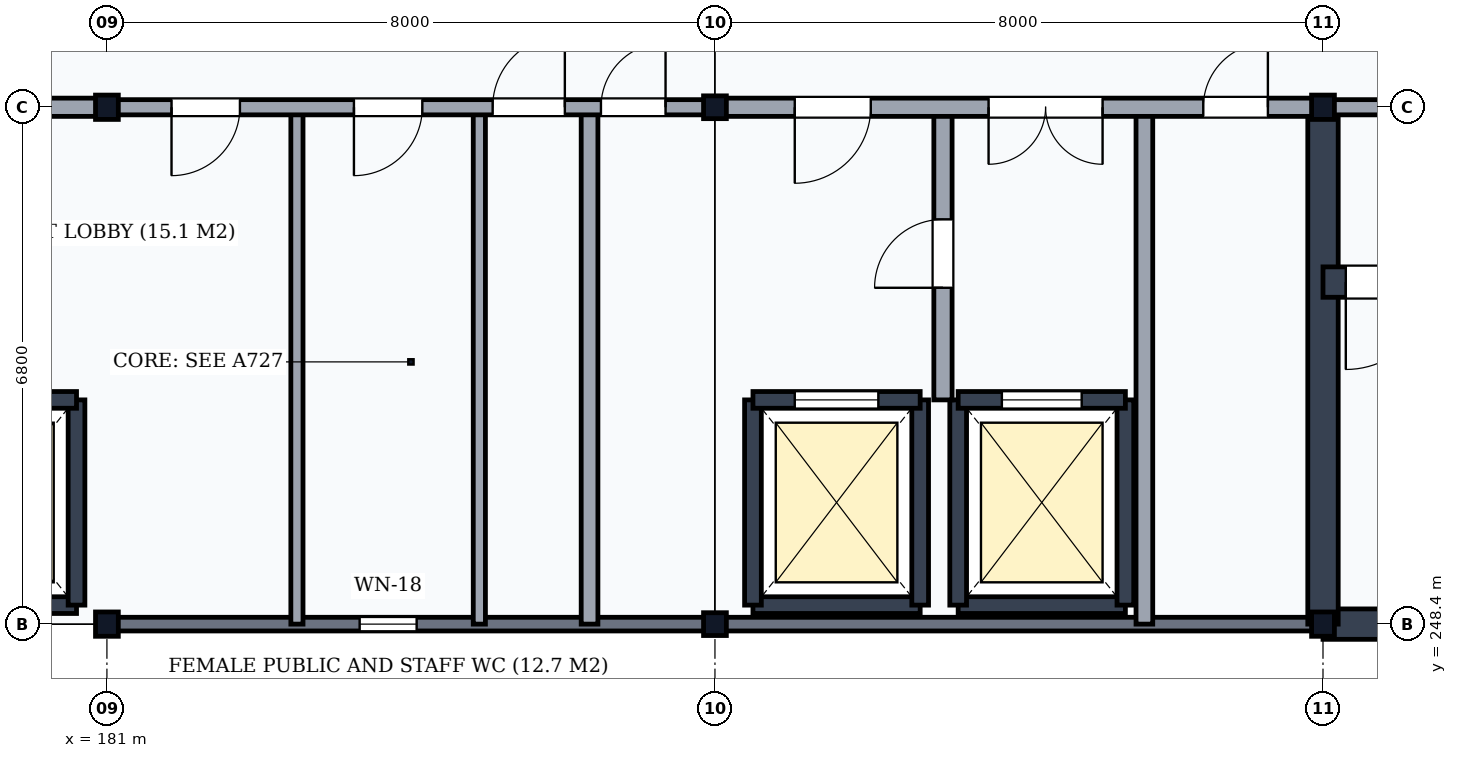
"""IFC4 building model, lengths in metres.
Left out: names, types, materials, properties, quantities, classifications, styles, units other than length and angle.
Written with IfcOpenShell. Run it as: python <this file> out.ifc"""

import sys

from ifc_helpers import new_model, si_unit, direction, frame, frame_2d, origin, origin_2d, place, context, subcontext, project, spatial, rectangle, i_section, extrude, element, fill, save


model = new_model("IFC4")
c1 = context("Model", 3, precision=1e-05, world=origin(), true_north=direction((0.0, 1.0)))
c2 = subcontext(c1, "Body", "Model", "MODEL_VIEW")
j1 = project(units=[si_unit("LENGTHUNIT", "METRE"), si_unit("PLANEANGLEUNIT", "RADIAN")], contexts=[c1])
p1 = place(None, origin())
s1 = spatial("IfcSite", under=j1, at=p1, CompositionType="ELEMENT")
p2 = place(p1, origin())
s2 = spatial("IfcBuilding", under=s1, at=p2, CompositionType="ELEMENT")
p3 = place(p2, frame((0.0, 0.0, 67.8)))
s3 = spatial("IfcBuildingStorey", under=s2, at=p3, CompositionType="ELEMENT", Elevation=67.8)
for number, where, z_axis, x_axis in (
    (1, (181.0, 248.4, 0.0), (0.0, 0.0, 1.0), (1.0, 0.0, 0.0)),
    (2, (181.0, 255.2, 0.0), (0.0, 0.0, 1.0), (1.0, 0.0, 0.0)),
):
    element("IfcColumn", number, at=place(p3, frame(where, z_axis=z_axis, x_axis=x_axis)), inside=s3, PredefinedType="COLUMN", context=c2, shape_type="SweptSolid", body=[
        extrude(i_section(OverallWidth=0.3, OverallDepth=0.32, WebThickness=0.011, FlangeThickness=0.021, FilletRadius=0.027, at=origin_2d()), origin(), (0.0, 0.0, 1.0), 4.5),
    ])
for number, where, z_axis, x_axis in (
    (3, (189.0, 248.4, 0.0), (0.0, 0.0, 1.0), (1.0, 0.0, 0.0)),
    (4, (189.0, 255.2, 0.0), (0.0, 0.0, 1.0), (1.0, 0.0, 0.0)),
):
    element("IfcColumn", number, at=place(p3, frame(where, z_axis=z_axis, x_axis=x_axis)), inside=s3, PredefinedType="COLUMN", context=c2, shape_type="SweptSolid", body=[
        extrude(i_section(OverallWidth=0.3, OverallDepth=0.3, WebThickness=0.011, FlangeThickness=0.019, FilletRadius=0.027, at=origin_2d()), origin(), (0.0, 0.0, 1.0), 4.5),
    ])
for number, where, z_axis, x_axis in (
    (5, (197.0, 248.4, 0.0), (0.0, 0.0, 1.0), (1.0, 0.0, 0.0)),
    (6, (197.0, 255.2, 0.0), (0.0, 0.0, 1.0), (1.0, 0.0, 0.0)),
):
    element("IfcColumn", number, at=place(p3, frame(where, z_axis=z_axis, x_axis=x_axis)), inside=s3, PredefinedType="COLUMN", context=c2, shape_type="SweptSolid", body=[
        extrude(i_section(OverallWidth=0.3, OverallDepth=0.32, WebThickness=0.011, FlangeThickness=0.021, FilletRadius=0.027, at=origin_2d()), origin(), (0.0, 0.0, 1.0), 4.5),
    ])
p4 = place(p3, frame((181.006, 248.4, 0.0), z_axis=(0.0, 0.0, 1.0), x_axis=(1.0, 0.0, 0.0)))
e7 = element("IfcWall", 7, at=p4, inside=s3, PredefinedType="SOLIDWALL", context=c2, shape_type="SweptSolid", body=[
    extrude(rectangle(XDim=7.988, YDim=0.18, at=frame_2d((3.994, 0.0))), origin(), (0.0, 0.0, 1.0), 3.988),
])
p5 = place(p4, frame((3.319, 0.0, 0.85)))
e8 = element("IfcOpeningElement", 8, at=p5, cuts=e7, PredefinedType="OPENING", context=c2, shape_type="SweptSolid", body=[
    extrude(rectangle(XDim=0.75, YDim=2.0, at=frame_2d((0.375, 1.0))), frame((0.0, 0.105, 0.0), z_axis=(0.0, -1.0, 0.0), x_axis=(1.0, 0.0, 0.0)), (0.0, 0.0, 1.0), 0.21),
])
p6 = place(p3, frame((189.006, 248.4, 0.0), z_axis=(0.0, 0.0, 1.0), x_axis=(1.0, 0.0, 0.0)))
e9 = element("IfcWall", 9, at=p6, inside=s3, PredefinedType="SOLIDWALL", context=c2, shape_type="SweptSolid", body=[
    extrude(rectangle(XDim=7.988, YDim=0.18, at=frame_2d((3.994, 0.0))), origin(), (0.0, 0.0, 1.0), 3.988),
])
p7 = place(p3, frame((197.0, 248.4, 0.0), z_axis=(0.0, 0.0, 1.0), x_axis=(1.0, 0.0, 0.0)))
e10 = element("IfcWall", 10, at=p7, inside=s3, PredefinedType="SHEAR", context=c2, shape_type="SweptSolid", body=[
    extrude(rectangle(XDim=8.0, YDim=0.4, at=frame_2d((4.0, 0.0))), origin(), (0.0, 0.0, 1.0), 4.3),
])
p8 = place(p3, frame((197.0, 248.4, 0.0), z_axis=(0.0, 0.0, 1.0), x_axis=(0.0, 1.0, 0.0)))
e11 = element("IfcWall", 11, at=p8, inside=s3, PredefinedType="SHEAR", context=c2, shape_type="SweptSolid", body=[
    extrude(rectangle(XDim=6.8, YDim=0.4, at=frame_2d((3.4, 0.0))), origin(), (0.0, 0.0, 1.0), 4.3),
])
p9 = place(p3, frame((197.0, 252.9, 0.0), z_axis=(0.0, 0.0, 1.0), x_axis=(1.0, 0.0, 0.0)))
e12 = element("IfcWall", 12, at=p9, inside=s3, PredefinedType="SHEAR", context=c2, shape_type="SweptSolid", body=[
    extrude(rectangle(XDim=8.0, YDim=0.4, at=frame_2d((4.0, 0.0))), origin(), (0.0, 0.0, 1.0), 4.3),
])
p10 = place(p9, frame((0.3, 0.0, 0.0)))
e13 = element("IfcOpeningElement", 13, at=p10, cuts=e12, PredefinedType="OPENING", context=c2, shape_type="SweptSolid", body=[
    extrude(rectangle(XDim=1.15, YDim=2.15, at=frame_2d((0.575, 1.075))), frame((0.0, 0.215, 0.0), z_axis=(0.0, -1.0, 0.0), x_axis=(1.0, 0.0, 0.0)), (0.0, 0.0, 1.0), 0.43),
])
p11 = place(p3, frame((197.0, 255.2, 0.0), z_axis=(0.0, 0.0, 1.0), x_axis=(1.0, 0.0, 0.0)))
e14 = element("IfcWall", 14, at=p11, inside=s3, PredefinedType="PARTITIONING", context=c2, shape_type="SweptSolid", body=[
    extrude(rectangle(XDim=8.0, YDim=0.2, at=frame_2d((4.0, 0.0))), origin(), (0.0, 0.0, 1.0), 3.798),
])
p12 = place(p11, frame((3.275, 0.0, 0.0)))
e15 = element("IfcOpeningElement", 15, at=p12, cuts=e14, PredefinedType="OPENING", context=c2, shape_type="SweptSolid", body=[
    extrude(rectangle(XDim=1.45, YDim=2.2, at=frame_2d((0.725, 1.1))), frame((0.0, 0.115, 0.0), z_axis=(0.0, -1.0, 0.0), x_axis=(1.0, 0.0, 0.0)), (0.0, 0.0, 1.0), 0.23),
])
p13 = place(p3, frame((178.4, 248.65, 0.0), z_axis=(0.0, 0.0, 1.0), x_axis=(1.0, 0.0, 0.0)))
e16 = element("IfcWall", 16, at=p13, inside=s3, PredefinedType="SHEAR", context=c2, shape_type="SweptSolid", body=[
    extrude(rectangle(XDim=2.2, YDim=0.22, at=frame_2d((1.1, 0.0))), origin(), (0.0, 0.0, 1.0), 4.3),
])
p14 = place(p3, frame((180.6, 248.65, 0.0), z_axis=(0.0, 0.0, 1.0), x_axis=(0.0, 1.0, 0.0)))
e17 = element("IfcWall", 17, at=p14, inside=s3, PredefinedType="SHEAR", context=c2, shape_type="SweptSolid", body=[
    extrude(rectangle(XDim=2.7, YDim=0.22, at=frame_2d((1.35, 0.0))), origin(), (0.0, 0.0, 1.0), 4.3),
])
p15 = place(p3, frame((178.4, 251.35, 0.0), z_axis=(0.0, 0.0, 1.0), x_axis=(1.0, 0.0, 0.0)))
e18 = element("IfcWall", 18, at=p15, inside=s3, PredefinedType="SHEAR", context=c2, shape_type="SweptSolid", body=[
    extrude(rectangle(XDim=2.2, YDim=0.22, at=frame_2d((1.1, 0.0))), origin(), (0.0, 0.0, 1.0), 4.3),
])
p16 = place(p15, frame((0.575, 0.0, 0.0)))
e19 = element("IfcOpeningElement", 19, at=p16, cuts=e18, PredefinedType="OPENING", context=c2, shape_type="SweptSolid", body=[
    extrude(rectangle(XDim=1.05, YDim=2.15, at=frame_2d((0.525, 1.075))), frame((0.0, 0.125, 0.0), z_axis=(0.0, -1.0, 0.0), x_axis=(1.0, 0.0, 0.0)), (0.0, 0.0, 1.0), 0.25),
])
p17 = place(p3, frame((189.5, 248.65, 0.0), z_axis=(0.0, 0.0, 1.0), x_axis=(1.0, 0.0, 0.0)))
e20 = element("IfcWall", 20, at=p17, inside=s3, PredefinedType="SHEAR", context=c2, shape_type="SweptSolid", body=[
    extrude(rectangle(XDim=2.2, YDim=0.22, at=frame_2d((1.1, 0.0))), origin(), (0.0, 0.0, 1.0), 4.3),
])
for number, where, z_axis, x_axis in (
    (21, (189.5, 248.65, 0.0), (0.0, 0.0, 1.0), (0.0, 1.0, 0.0)),
    (22, (191.7, 248.65, 0.0), (0.0, 0.0, 1.0), (0.0, 1.0, 0.0)),
):
    element("IfcWall", number, at=place(p3, frame(where, z_axis=z_axis, x_axis=x_axis)), inside=s3, PredefinedType="SHEAR", context=c2, shape_type="SweptSolid", body=[
        extrude(rectangle(XDim=2.7, YDim=0.22, at=frame_2d((1.35, 0.0))), origin(), (0.0, 0.0, 1.0), 4.3),
    ])
p18 = place(p3, frame((189.5, 251.35, 0.0), z_axis=(0.0, 0.0, 1.0), x_axis=(1.0, 0.0, 0.0)))
e23 = element("IfcWall", 23, at=p18, inside=s3, PredefinedType="SHEAR", context=c2, shape_type="SweptSolid", body=[
    extrude(rectangle(XDim=2.2, YDim=0.22, at=frame_2d((1.1, 0.0))), origin(), (0.0, 0.0, 1.0), 4.3),
])
p19 = place(p18, frame((0.55, 0.0, 0.0)))
e24 = element("IfcOpeningElement", 24, at=p19, cuts=e23, PredefinedType="OPENING", context=c2, shape_type="SweptSolid", body=[
    extrude(rectangle(XDim=1.1, YDim=2.15, at=frame_2d((0.55, 1.075))), frame((0.0, 0.125, 0.0), z_axis=(0.0, -1.0, 0.0), x_axis=(1.0, 0.0, 0.0)), (0.0, 0.0, 1.0), 0.25),
])
p20 = place(p3, frame((192.2, 248.65, 0.0), z_axis=(0.0, 0.0, 1.0), x_axis=(1.0, 0.0, 0.0)))
e25 = element("IfcWall", 25, at=p20, inside=s3, PredefinedType="SHEAR", context=c2, shape_type="SweptSolid", body=[
    extrude(rectangle(XDim=2.2, YDim=0.22, at=frame_2d((1.1, 0.0))), origin(), (0.0, 0.0, 1.0), 4.3),
])
for number, where, z_axis, x_axis in (
    (26, (192.2, 248.65, 0.0), (0.0, 0.0, 1.0), (0.0, 1.0, 0.0)),
    (27, (194.4, 248.65, 0.0), (0.0, 0.0, 1.0), (0.0, 1.0, 0.0)),
):
    element("IfcWall", number, at=place(p3, frame(where, z_axis=z_axis, x_axis=x_axis)), inside=s3, PredefinedType="SHEAR", context=c2, shape_type="SweptSolid", body=[
        extrude(rectangle(XDim=2.7, YDim=0.22, at=frame_2d((1.35, 0.0))), origin(), (0.0, 0.0, 1.0), 4.3),
    ])
p21 = place(p3, frame((192.2, 251.35, 0.0), z_axis=(0.0, 0.0, 1.0), x_axis=(1.0, 0.0, 0.0)))
e28 = element("IfcWall", 28, at=p21, inside=s3, PredefinedType="SHEAR", context=c2, shape_type="SweptSolid", body=[
    extrude(rectangle(XDim=2.2, YDim=0.22, at=frame_2d((1.1, 0.0))), origin(), (0.0, 0.0, 1.0), 4.3),
])
p22 = place(p21, frame((0.575, 0.0, 0.0)))
e29 = element("IfcOpeningElement", 29, at=p22, cuts=e28, PredefinedType="OPENING", context=c2, shape_type="SweptSolid", body=[
    extrude(rectangle(XDim=1.05, YDim=2.15, at=frame_2d((0.525, 1.075))), frame((0.0, 0.125, 0.0), z_axis=(0.0, -1.0, 0.0), x_axis=(1.0, 0.0, 0.0)), (0.0, 0.0, 1.0), 0.25),
])
p23 = place(p3, frame((192.0, 251.35, 0.0), z_axis=(0.0, 0.0, 1.0), x_axis=(0.0, 1.0, 0.0)))
e30 = element("IfcWall", 30, at=p23, inside=s3, PredefinedType="PARTITIONING", context=c2, shape_type="SweptSolid", body=[
    extrude(rectangle(XDim=3.85, YDim=0.24, at=frame_2d((1.925, 0.0))), origin(), (0.0, 0.0, 1.0), 4.3),
])
p24 = place(p23, frame((1.475, 0.0, 0.0)))
e31 = element("IfcOpeningElement", 31, at=p24, cuts=e30, PredefinedType="OPENING", context=c2, shape_type="SweptSolid", body=[
    extrude(rectangle(XDim=0.9, YDim=2.1, at=frame_2d((0.45, 1.05))), frame((0.0, 0.135, 0.0), z_axis=(0.0, -1.0, 0.0), x_axis=(1.0, 0.0, 0.0)), (0.0, 0.0, 1.0), 0.27),
])
p25 = place(p3, frame((194.65, 248.4, 0.0), z_axis=(0.0, 0.0, 1.0), x_axis=(0.0, 1.0, 0.0)))
e32 = element("IfcWall", 32, at=p25, inside=s3, PredefinedType="PARTITIONING", context=c2, shape_type="SweptSolid", body=[
    extrude(rectangle(XDim=6.8, YDim=0.22, at=frame_2d((3.4, 0.0))), origin(), (0.0, 0.0, 1.0), 4.3),
])
for number, where, z_axis, x_axis in (
    (33, (183.5, 248.4, 0.0), (0.0, 0.0, 1.0), (0.0, 1.0, 0.0)),
    (34, (185.9, 248.4, 0.0), (0.0, 0.0, 1.0), (0.0, 1.0, 0.0)),
):
    element("IfcWall", number, at=place(p3, frame(where, z_axis=z_axis, x_axis=x_axis)), inside=s3, PredefinedType="PARTITIONING", context=c2, shape_type="SweptSolid", body=[
        extrude(rectangle(XDim=6.8, YDim=0.16, at=frame_2d((3.4, 0.0))), origin(), (0.0, 0.0, 1.0), 4.3),
    ])
p26 = place(p3, frame((187.35, 248.4, 0.0), z_axis=(0.0, 0.0, 1.0), x_axis=(0.0, 1.0, 0.0)))
e35 = element("IfcWall", 35, at=p26, inside=s3, PredefinedType="PARTITIONING", context=c2, shape_type="SweptSolid", body=[
    extrude(rectangle(XDim=6.8, YDim=0.22, at=frame_2d((3.4, 0.0))), origin(), (0.0, 0.0, 1.0), 4.3),
])
p27 = place(p3, frame((173.0, 255.2, 0.0), z_axis=(0.0, 0.0, 1.0), x_axis=(1.0, 0.0, 0.0)))
e36 = element("IfcWall", 36, at=p27, inside=s3, PredefinedType="PARTITIONING", context=c2, shape_type="SweptSolid", body=[
    extrude(rectangle(XDim=8.0, YDim=0.24, at=frame_2d((4.0, 0.0))), origin(), (0.0, 0.0, 1.0), 3.798),
])
p28 = place(p27, frame((1.05, 0.0, 0.0)))
e37 = element("IfcOpeningElement", 37, at=p28, cuts=e36, PredefinedType="OPENING", context=c2, shape_type="SweptSolid", body=[
    extrude(rectangle(XDim=1.0, YDim=2.1, at=frame_2d((0.5, 1.05))), frame((0.0, 0.135, 0.0), z_axis=(0.0, -1.0, 0.0), x_axis=(1.0, 0.0, 0.0)), (0.0, 0.0, 1.0), 0.27),
])
p29 = place(p27, frame((4.6, 0.0, 0.0)))
e38 = element("IfcOpeningElement", 38, at=p29, cuts=e36, PredefinedType="OPENING", context=c2, shape_type="SweptSolid", body=[
    extrude(rectangle(XDim=1.6, YDim=2.25, at=frame_2d((0.8, 1.125))), frame((0.0, 0.135, 0.0), z_axis=(0.0, -1.0, 0.0), x_axis=(1.0, 0.0, 0.0)), (0.0, 0.0, 1.0), 0.27),
])
p30 = place(p3, frame((181.0, 255.2, 0.0), z_axis=(0.0, 0.0, 1.0), x_axis=(1.0, 0.0, 0.0)))
e39 = element("IfcWall", 39, at=p30, inside=s3, PredefinedType="PARTITIONING", context=c2, shape_type="SweptSolid", body=[
    extrude(rectangle(XDim=8.0, YDim=0.2, at=frame_2d((4.0, 0.0))), origin(), (0.0, 0.0, 1.0), 3.798),
])
p31 = place(p30, frame((0.85, 0.0, 0.0)))
e40 = element("IfcOpeningElement", 40, at=p31, cuts=e39, PredefinedType="OPENING", context=c2, shape_type="SweptSolid", body=[
    extrude(rectangle(XDim=0.9, YDim=2.1, at=frame_2d((0.45, 1.05))), frame((0.0, 0.115, 0.0), z_axis=(0.0, -1.0, 0.0), x_axis=(1.0, 0.0, 0.0)), (0.0, 0.0, 1.0), 0.23),
])
p32 = place(p30, frame((3.25, 0.0, 0.0)))
e41 = element("IfcOpeningElement", 41, at=p32, cuts=e39, PredefinedType="OPENING", context=c2, shape_type="SweptSolid", body=[
    extrude(rectangle(XDim=0.9, YDim=2.1, at=frame_2d((0.45, 1.05))), frame((0.0, 0.115, 0.0), z_axis=(0.0, -1.0, 0.0), x_axis=(1.0, 0.0, 0.0)), (0.0, 0.0, 1.0), 0.23),
])
p33 = place(p30, frame((5.075, 0.0, 0.0)))
e42 = element("IfcOpeningElement", 42, at=p33, cuts=e39, PredefinedType="OPENING", context=c2, shape_type="SweptSolid", body=[
    extrude(rectangle(XDim=0.95, YDim=2.1, at=frame_2d((0.475, 1.05))), frame((0.0, 0.115, 0.0), z_axis=(0.0, -1.0, 0.0), x_axis=(1.0, 0.0, 0.0)), (0.0, 0.0, 1.0), 0.23),
])
p34 = place(p30, frame((6.5, 0.0, 0.0)))
e43 = element("IfcOpeningElement", 43, at=p34, cuts=e39, PredefinedType="OPENING", context=c2, shape_type="SweptSolid", body=[
    extrude(rectangle(XDim=0.85, YDim=2.1, at=frame_2d((0.425, 1.05))), frame((0.0, 0.115, 0.0), z_axis=(0.0, -1.0, 0.0), x_axis=(1.0, 0.0, 0.0)), (0.0, 0.0, 1.0), 0.23),
])
p35 = place(p3, frame((189.0, 255.2, 0.0), z_axis=(0.0, 0.0, 1.0), x_axis=(1.0, 0.0, 0.0)))
e44 = element("IfcWall", 44, at=p35, inside=s3, PredefinedType="PARTITIONING", context=c2, shape_type="SweptSolid", body=[
    extrude(rectangle(XDim=8.0, YDim=0.24, at=frame_2d((4.0, 0.0))), origin(), (0.0, 0.0, 1.0), 3.798),
])
p36 = place(p35, frame((1.05, 0.0, 0.0)))
e45 = element("IfcOpeningElement", 45, at=p36, cuts=e44, PredefinedType="OPENING", context=c2, shape_type="SweptSolid", body=[
    extrude(rectangle(XDim=1.0, YDim=2.1, at=frame_2d((0.5, 1.05))), frame((0.0, 0.135, 0.0), z_axis=(0.0, -1.0, 0.0), x_axis=(1.0, 0.0, 0.0)), (0.0, 0.0, 1.0), 0.27),
])
p37 = place(p35, frame((3.6, 0.0, 0.0)))
e46 = element("IfcOpeningElement", 46, at=p37, cuts=e44, PredefinedType="OPENING", context=c2, shape_type="SweptSolid", body=[
    extrude(rectangle(XDim=1.5, YDim=2.25, at=frame_2d((0.75, 1.125))), frame((0.0, 0.135, 0.0), z_axis=(0.0, -1.0, 0.0), x_axis=(1.0, 0.0, 0.0)), (0.0, 0.0, 1.0), 0.27),
])
p38 = place(p35, frame((6.425, 0.0, 0.0)))
e47 = element("IfcOpeningElement", 47, at=p38, cuts=e44, PredefinedType="OPENING", context=c2, shape_type="SweptSolid", body=[
    extrude(rectangle(XDim=0.85, YDim=2.1, at=frame_2d((0.425, 1.05))), frame((0.0, 0.135, 0.0), z_axis=(0.0, -1.0, 0.0), x_axis=(1.0, 0.0, 0.0)), (0.0, 0.0, 1.0), 0.27),
])
p39 = place(p5, origin())
e48 = element("IfcWindow", 48, at=p39, inside=s3, PartitioningType="SINGLE_PANEL", PredefinedType="WINDOW", context=c2, shape_type="SweptSolid", body=[
    extrude(rectangle(XDim=0.75, YDim=2.0, at=frame_2d((0.375, 1.0))), frame((0.0, 0.03, 0.0), z_axis=(0.0, -1.0, 0.0), x_axis=(1.0, 0.0, 0.0)), (0.0, 0.0, 1.0), 0.06),
])
fill(e8, e48)
p40 = place(p10, frame((1.15, 0.0, 0.0), z_axis=(0.0, 0.0, 1.0), x_axis=(-1.0, 0.0, 0.0)))
e49 = element("IfcDoor", 49, at=p40, inside=s3, OperationType="SINGLE_SWING_RIGHT", PredefinedType="DOOR", context=c2, shape_type="SweptSolid", body=[
    extrude(rectangle(XDim=1.15, YDim=2.15, at=frame_2d((0.575, 1.075))), frame((0.0, 0.025, 0.0), z_axis=(0.0, -1.0, 0.0), x_axis=(1.0, 0.0, 0.0)), (0.0, 0.0, 1.0), 0.05),
])
fill(e13, e49)
p41 = place(p19, origin())
e50 = element("IfcDoor", 50, at=p41, inside=s3, OperationType="DOUBLE_DOOR_SLIDING", PredefinedType="USERDEFINED", context=c2, shape_type="SweptSolid", body=[
    extrude(rectangle(XDim=1.1, YDim=2.15, at=frame_2d((0.55, 1.075))), frame((0.0, 0.025, 0.0), z_axis=(0.0, -1.0, 0.0), x_axis=(1.0, 0.0, 0.0)), (0.0, 0.0, 1.0), 0.05),
])
fill(e24, e50)
p42 = place(p22, origin())
e51 = element("IfcDoor", 51, at=p42, inside=s3, OperationType="DOUBLE_DOOR_SLIDING", PredefinedType="USERDEFINED", context=c2, shape_type="SweptSolid", body=[
    extrude(rectangle(XDim=1.05, YDim=2.15, at=frame_2d((0.525, 1.075))), frame((0.0, 0.025, 0.0), z_axis=(0.0, -1.0, 0.0), x_axis=(1.0, 0.0, 0.0)), (0.0, 0.0, 1.0), 0.05),
])
fill(e29, e51)
p43 = place(p24, origin())
e52 = element("IfcDoor", 52, at=p43, inside=s3, OperationType="SINGLE_SWING_LEFT", PredefinedType="DOOR", context=c2, shape_type="SweptSolid", body=[
    extrude(rectangle(XDim=0.9, YDim=2.1, at=frame_2d((0.45, 1.05))), frame((0.0, 0.025, 0.0), z_axis=(0.0, -1.0, 0.0), x_axis=(1.0, 0.0, 0.0)), (0.0, 0.0, 1.0), 0.05),
])
fill(e31, e52)
p44 = place(p31, frame((0.9, 0.0, 0.0), z_axis=(0.0, 0.0, 1.0), x_axis=(-1.0, 0.0, 0.0)))
e53 = element("IfcDoor", 53, at=p44, inside=s3, OperationType="SINGLE_SWING_RIGHT", PredefinedType="DOOR", context=c2, shape_type="SweptSolid", body=[
    extrude(rectangle(XDim=0.9, YDim=2.1, at=frame_2d((0.45, 1.05))), frame((0.0, 0.025, 0.0), z_axis=(0.0, -1.0, 0.0), x_axis=(1.0, 0.0, 0.0)), (0.0, 0.0, 1.0), 0.05),
])
fill(e40, e53)
p45 = place(p32, frame((0.9, 0.0, 0.0), z_axis=(0.0, 0.0, 1.0), x_axis=(-1.0, 0.0, 0.0)))
e54 = element("IfcDoor", 54, at=p45, inside=s3, OperationType="SINGLE_SWING_RIGHT", PredefinedType="DOOR", context=c2, shape_type="SweptSolid", body=[
    extrude(rectangle(XDim=0.9, YDim=2.1, at=frame_2d((0.45, 1.05))), frame((0.0, 0.025, 0.0), z_axis=(0.0, -1.0, 0.0), x_axis=(1.0, 0.0, 0.0)), (0.0, 0.0, 1.0), 0.05),
])
fill(e41, e54)
p46 = place(p33, frame((0.95, 0.0, 0.0), z_axis=(0.0, 0.0, 1.0), x_axis=(-1.0, 0.0, 0.0)))
e55 = element("IfcDoor", 55, at=p46, inside=s3, OperationType="SINGLE_SWING_LEFT", PredefinedType="DOOR", context=c2, shape_type="SweptSolid", body=[
    extrude(rectangle(XDim=0.95, YDim=2.1, at=frame_2d((0.475, 1.05))), frame((0.0, 0.025, 0.0), z_axis=(0.0, -1.0, 0.0), x_axis=(1.0, 0.0, 0.0)), (0.0, 0.0, 1.0), 0.05),
])
fill(e42, e55)
p47 = place(p34, frame((0.85, 0.0, 0.0), z_axis=(0.0, 0.0, 1.0), x_axis=(-1.0, 0.0, 0.0)))
e56 = element("IfcDoor", 56, at=p47, inside=s3, OperationType="SINGLE_SWING_LEFT", PredefinedType="DOOR", context=c2, shape_type="SweptSolid", body=[
    extrude(rectangle(XDim=0.85, YDim=2.1, at=frame_2d((0.425, 1.05))), frame((0.0, 0.025, 0.0), z_axis=(0.0, -1.0, 0.0), x_axis=(1.0, 0.0, 0.0)), (0.0, 0.0, 1.0), 0.05),
])
fill(e43, e56)
p48 = place(p36, frame((1.0, 0.0, 0.0), z_axis=(0.0, 0.0, 1.0), x_axis=(-1.0, 0.0, 0.0)))
e57 = element("IfcDoor", 57, at=p48, inside=s3, OperationType="SINGLE_SWING_RIGHT", PredefinedType="DOOR", context=c2, shape_type="SweptSolid", body=[
    extrude(rectangle(XDim=1.0, YDim=2.1, at=frame_2d((0.5, 1.05))), frame((0.0, 0.025, 0.0), z_axis=(0.0, -1.0, 0.0), x_axis=(1.0, 0.0, 0.0)), (0.0, 0.0, 1.0), 0.05),
])
fill(e45, e57)
p49 = place(p37, frame((1.5, 0.0, 0.0), z_axis=(0.0, 0.0, 1.0), x_axis=(-1.0, 0.0, 0.0)))
e58 = element("IfcDoor", 58, at=p49, inside=s3, OperationType="DOUBLE_DOOR_SINGLE_SWING", PredefinedType="DOOR", context=c2, shape_type="SweptSolid", body=[
    extrude(rectangle(XDim=1.5, YDim=2.25, at=frame_2d((0.75, 1.125))), frame((0.0, 0.025, 0.0), z_axis=(0.0, -1.0, 0.0), x_axis=(1.0, 0.0, 0.0)), (0.0, 0.0, 1.0), 0.05),
])
fill(e46, e58)
p50 = place(p38, frame((0.85, 0.0, 0.0), z_axis=(0.0, 0.0, 1.0), x_axis=(-1.0, 0.0, 0.0)))
e59 = element("IfcDoor", 59, at=p50, inside=s3, OperationType="SINGLE_SWING_LEFT", PredefinedType="DOOR", context=c2, shape_type="SweptSolid", body=[
    extrude(rectangle(XDim=0.85, YDim=2.1, at=frame_2d((0.425, 1.05))), frame((0.0, 0.025, 0.0), z_axis=(0.0, -1.0, 0.0), x_axis=(1.0, 0.0, 0.0)), (0.0, 0.0, 1.0), 0.05),
])
fill(e47, e59)
save(model, sys.argv[1])
